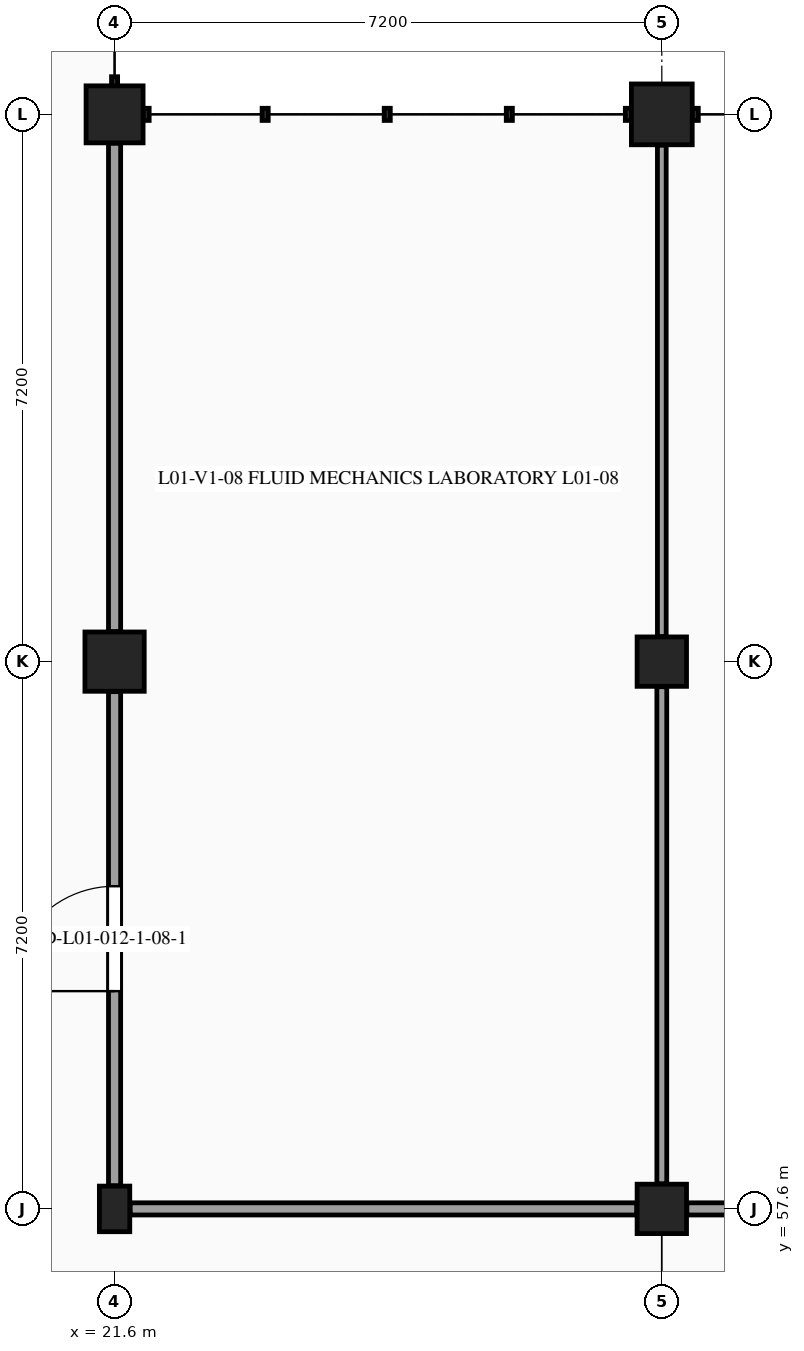
"""IFC4 building model, lengths in metres.
Left out: names, types, materials, properties, quantities, classifications, styles, units other than length and angle.
Written with IfcOpenShell. Run it as: python <this file> out.ifc"""

import sys

from ifc_helpers import new_model, si_unit, direction, frame, frame_2d, origin, origin_2d, place, context, subcontext, project, spatial, rectangle, circle, extrude, element, fill, save


model = new_model("IFC4")
c1 = context("Model", 3, precision=1e-05, world=origin(), true_north=direction((0.0, 1.0)))
c2 = subcontext(c1, "Body", "Model", "MODEL_VIEW")
j1 = project(units=[si_unit("LENGTHUNIT", "METRE"), si_unit("PLANEANGLEUNIT", "RADIAN")], contexts=[c1])
p1 = place(None, origin())
s1 = spatial("IfcSite", under=j1, at=p1, CompositionType="ELEMENT")
p2 = place(p1, origin())
s2 = spatial("IfcBuilding", under=s1, at=p2, CompositionType="ELEMENT")
p3 = place(p2, frame((0.0, 0.0, 5.4)))
s3 = spatial("IfcBuildingStorey", under=s2, at=p3, CompositionType="ELEMENT", Elevation=5.4)
p4 = place(p3, frame((21.6, 57.6, 0.0), z_axis=(0.0, 0.0, 1.0), x_axis=(1.0, 0.0, 0.0)))
e1 = element("IfcColumn", 1, at=p4, inside=s3, PredefinedType="PILASTER", context=c2, shape_type="SweptSolid", body=[
    extrude(rectangle(XDim=0.4, YDim=0.6, at=origin_2d()), origin(), (0.0, 0.0, 1.0), 4.5),
])
p5 = place(p3, frame((21.6, 64.8, 0.0), z_axis=(0.0, 0.0, 1.0), x_axis=(1.0, 0.0, 0.0)))
e2 = element("IfcColumn", 2, at=p5, inside=s3, PredefinedType="COLUMN", context=c2, shape_type="SweptSolid", body=[
    extrude(rectangle(XDim=0.78, YDim=0.78, at=origin_2d()), origin(), (0.0, 0.0, 1.0), 4.5),
])
p6 = place(p3, frame((21.6, 72.0, 0.0), z_axis=(0.0, 0.0, 1.0), x_axis=(1.0, 0.0, 0.0)))
e3 = element("IfcColumn", 3, at=p6, inside=s3, PredefinedType="COLUMN", context=c2, shape_type="SweptSolid", body=[
    extrude(rectangle(XDim=0.75, YDim=0.75, at=origin_2d()), origin(), (0.0, 0.0, 1.0), 4.5),
])
for number, where, z_axis, x_axis in (
    (4, (28.8, 57.6, 0.0), (0.0, 0.0, 1.0), (1.0, 0.0, 0.0)),
    (5, (28.8, 64.8, 0.0), (0.0, 0.0, 1.0), (1.0, 0.0, 0.0)),
):
    element("IfcColumn", number, at=place(p3, frame(where, z_axis=z_axis, x_axis=x_axis)), inside=s3, PredefinedType="COLUMN", context=c2, shape_type="SweptSolid", body=[
        extrude(rectangle(XDim=0.65, YDim=0.65, at=origin_2d()), origin(), (0.0, 0.0, 1.0), 4.5),
    ])
p7 = place(p3, frame((28.8, 72.0, 0.0), z_axis=(0.0, 0.0, 1.0), x_axis=(1.0, 0.0, 0.0)))
e6 = element("IfcColumn", 6, at=p7, inside=s3, PredefinedType="COLUMN", context=c2, shape_type="SweptSolid", body=[
    extrude(circle(Radius=0.4, at=origin_2d()), origin(), (0.0, 0.0, 1.0), 4.5),
])
p8 = place(p3, frame((21.6, 57.905, 0.0), z_axis=(0.0, 0.0, 1.0), x_axis=(0.0, 1.0, 0.0)))
e7 = element("IfcWall", 7, at=p8, inside=s3, PredefinedType="PARTITIONING", context=c2, shape_type="SweptSolid", body=[
    extrude(rectangle(XDim=6.5, YDim=0.16, at=frame_2d((3.25, 0.0))), origin(), (0.0, 0.0, 1.0), 3.525),
])
p9 = place(p8, frame((2.56, 0.0, 0.0)))
e8 = element("IfcOpeningElement", 8, at=p9, cuts=e7, PredefinedType="OPENING", context=c2, shape_type="SweptSolid", body=[
    extrude(rectangle(XDim=1.38, YDim=2.22, at=frame_2d((0.69, 1.11))), frame((0.0, 0.09, 0.0), z_axis=(0.0, -1.0, 0.0), x_axis=(1.0, 0.0, 0.0)), (0.0, 0.0, 1.0), 0.18),
])
p10 = place(p3, frame((21.6, 65.195, 0.0), z_axis=(0.0, 0.0, 1.0), x_axis=(0.0, 1.0, 0.0)))
e9 = element("IfcWall", 9, at=p10, inside=s3, PredefinedType="PARTITIONING", context=c2, shape_type="SweptSolid", body=[
    extrude(rectangle(XDim=6.425, YDim=0.16, at=frame_2d((3.212, 0.0))), origin(), (0.0, 0.0, 1.0), 3.52),
])
p11 = place(p3, frame((21.805, 57.6, 0.0), z_axis=(0.0, 0.0, 1.0), x_axis=(1.0, 0.0, 0.0)))
e10 = element("IfcWall", 10, at=p11, inside=s3, PredefinedType="PARTITIONING", context=c2, shape_type="SweptSolid", body=[
    extrude(rectangle(XDim=6.665, YDim=0.16, at=frame_2d((3.333, 0.0))), origin(), (0.0, 0.0, 1.0), 3.49),
])
p12 = place(p3, frame((28.8, 57.93, 0.0), z_axis=(0.0, 0.0, 1.0), x_axis=(0.0, 1.0, 0.0)))
e11 = element("IfcWall", 11, at=p12, inside=s3, PredefinedType="PARTITIONING", context=c2, shape_type="SweptSolid", body=[
    extrude(rectangle(XDim=6.54, YDim=0.13, at=frame_2d((3.27, 0.0))), origin(), (0.0, 0.0, 1.0), 3.525),
])
p13 = place(p3, frame((28.8, 65.13, 0.0), z_axis=(0.0, 0.0, 1.0), x_axis=(0.0, 1.0, 0.0)))
e12 = element("IfcWall", 12, at=p13, inside=s3, PredefinedType="PARTITIONING", context=c2, shape_type="SweptSolid", body=[
    extrude(rectangle(XDim=6.465, YDim=0.115, at=frame_2d((3.232, 0.0))), origin(), (0.0, 0.0, 1.0), 3.52),
])
p14 = place(p3, frame((29.13, 57.6, 0.0), z_axis=(0.0, 0.0, 1.0), x_axis=(1.0, 0.0, 0.0)))
e13 = element("IfcWall", 13, at=p14, inside=s3, PredefinedType="PARTITIONING", context=c2, shape_type="SweptSolid", body=[
    extrude(rectangle(XDim=6.54, YDim=0.16, at=frame_2d((3.27, 0.0))), origin(), (0.0, 0.0, 1.0), 3.51),
])
p15 = place(p14, frame((2.39, 0.0, 0.0)))
e14 = element("IfcOpeningElement", 14, at=p15, cuts=e13, PredefinedType="OPENING", context=c2, shape_type="SweptSolid", body=[
    extrude(rectangle(XDim=1.76, YDim=2.3, at=frame_2d((0.88, 1.15))), frame((0.0, 0.09, 0.0), z_axis=(0.0, -1.0, 0.0), x_axis=(1.0, 0.0, 0.0)), (0.0, 0.0, 1.0), 0.18),
])
p16 = place(p9, origin())
e15 = element("IfcDoor", 15, at=p16, inside=s3, OperationType="SINGLE_SWING_LEFT", PredefinedType="DOOR", context=c2, shape_type="SweptSolid", body=[
    extrude(rectangle(XDim=1.38, YDim=2.22, at=frame_2d((0.69, 1.11))), frame((0.0, 0.025, 0.0), z_axis=(0.0, -1.0, 0.0), x_axis=(1.0, 0.0, 0.0)), (0.0, 0.0, 1.0), 0.05),
])
fill(e8, e15)
save(model, sys.argv[1])
